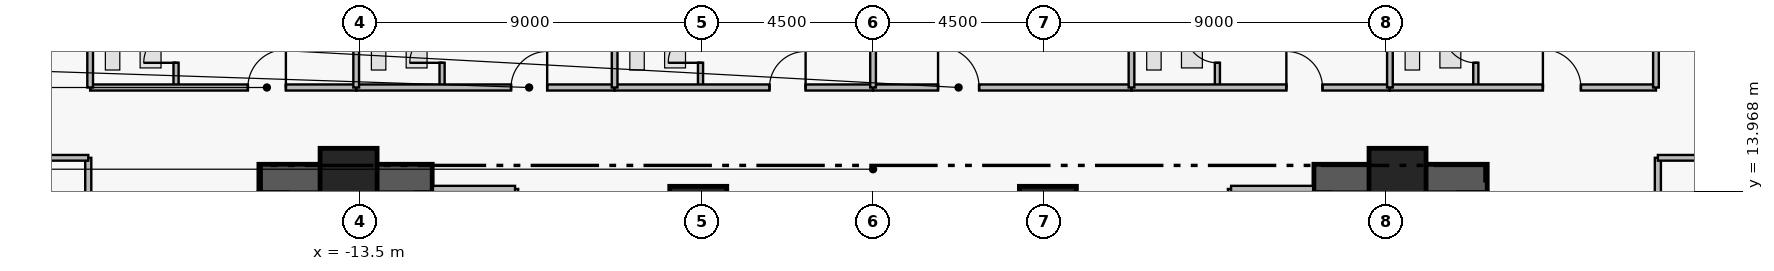
"""IFC4 building model, lengths in metres.
Left out: names, types, materials, properties, quantities, classifications, styles, units other than length and angle.
Written with IfcOpenShell. Run it as: python <this file> out.ifc"""

import sys

from ifc_helpers import new_model, si_unit, direction, frame, frame_2d, origin, origin_2d, place, context, subcontext, project, spatial, rectangle, extrude, element, fill, save


model = new_model("IFC4")
c1 = context("Model", 3, precision=1e-05, world=origin(), true_north=direction((0.0, 1.0)))
c2 = subcontext(c1, "Body", "Model", "MODEL_VIEW")
j1 = project(units=[si_unit("LENGTHUNIT", "METRE"), si_unit("PLANEANGLEUNIT", "RADIAN")], contexts=[c1])
p1 = place(None, origin())
s1 = spatial("IfcSite", under=j1, at=p1, CompositionType="ELEMENT")
p2 = place(p1, origin())
s2 = spatial("IfcBuilding", under=s1, at=p2, CompositionType="ELEMENT")
p3 = place(p2, frame((0.0, 0.0, 132.15)))
s3 = spatial("IfcBuildingStorey", under=s2, at=p3, CompositionType="ELEMENT", Elevation=132.15)
for number, where, z_axis, x_axis in (
    (1, (-16.16, 14.305, 0.0), (0.0, 0.0, 1.0), (1.0, 0.0, 0.0)),
    (2, (11.6, 14.305, 0.0), (0.0, 0.0, 1.0), (1.0, 0.0, 0.0)),
):
    element("IfcWall", number, at=place(p3, frame(where, z_axis=z_axis, x_axis=x_axis)), inside=s3, PredefinedType="SHEAR", context=c2, shape_type="SweptSolid", body=[
        extrude(rectangle(XDim=4.56, YDim=0.75, at=frame_2d((2.28, 0.0))), origin(), (0.0, 0.0, 1.0), 3.46),
    ])
for number, where, z_axis, x_axis in (
    (3, (-13.8, 14.35, 0.0), (0.0, 0.0, 1.0), (1.0, 0.0, 0.0)),
    (4, (-4.6, 13.35, 0.0), (0.0, 0.0, 1.0), (1.0, 0.0, 0.0)),
    (5, (4.6, 13.35, 0.0), (0.0, 0.0, 1.0), (1.0, 0.0, 0.0)),
    (6, (13.8, 14.35, 0.0), (0.0, 0.0, 1.0), (1.0, 0.0, 0.0)),
):
    element("IfcColumn", number, at=place(p3, frame(where, z_axis=z_axis, x_axis=x_axis)), inside=s3, PredefinedType="COLUMN", context=c2, shape_type="SweptSolid", body=[
        extrude(rectangle(XDim=1.5, YDim=1.5, at=origin_2d()), origin(), (0.0, 0.0, 1.0), 3.65),
    ])
p4 = place(p3, frame((-18.34, 16.7, 0.0), z_axis=(0.0, 0.0, 1.0), x_axis=(0.0, 1.0, 0.0)))
e7 = element("IfcWall", 7, at=p4, inside=s3, PredefinedType="PLUMBINGWALL", context=c2, shape_type="SweptSolid", body=[
    extrude(rectangle(XDim=2.36, YDim=0.135, at=frame_2d((1.18, 0.0))), origin(), (0.0, 0.0, 1.0), 3.43),
])
p5 = place(p4, frame((0.65, 0.0, 0.0)))
e8 = element("IfcOpeningElement", 8, at=p5, cuts=e7, PredefinedType="OPENING", context=c2, shape_type="SweptSolid", body=[
    extrude(rectangle(XDim=0.85, YDim=2.1, at=frame_2d((0.425, 1.05))), frame((0.0, 0.077, 0.0), z_axis=(0.0, -1.0, 0.0), x_axis=(1.0, 0.0, 0.0)), (0.0, 0.0, 1.0), 0.155),
])
p6 = place(p3, frame((-20.6, 16.7, 0.0), z_axis=(0.0, 0.0, 1.0), x_axis=(1.0, 0.0, 0.0)))
e9 = element("IfcWall", 9, at=p6, inside=s3, PredefinedType="PARTITIONING", context=c2, shape_type="SweptSolid", body=[
    extrude(rectangle(XDim=7.0, YDim=0.16, at=frame_2d((3.5, 0.0))), origin(), (0.0, 0.0, 1.0), 3.43),
])
p7 = place(p6, frame((4.15, 0.0, 0.0)))
e10 = element("IfcOpeningElement", 10, at=p7, cuts=e9, PredefinedType="OPENING", context=c2, shape_type="SweptSolid", body=[
    extrude(rectangle(XDim=1.0, YDim=2.15, at=frame_2d((0.5, 1.075))), frame((0.0, 0.09, 0.0), z_axis=(0.0, -1.0, 0.0), x_axis=(1.0, 0.0, 0.0)), (0.0, 0.0, 1.0), 0.18),
])
p8 = place(p3, frame((-11.34, 16.7, 0.0), z_axis=(0.0, 0.0, 1.0), x_axis=(0.0, 1.0, 0.0)))
e11 = element("IfcWall", 11, at=p8, inside=s3, PredefinedType="PLUMBINGWALL", context=c2, shape_type="SweptSolid", body=[
    extrude(rectangle(XDim=2.36, YDim=0.135, at=frame_2d((1.18, 0.0))), origin(), (0.0, 0.0, 1.0), 3.43),
])
p9 = place(p8, frame((0.65, 0.0, 0.0)))
e12 = element("IfcOpeningElement", 12, at=p9, cuts=e11, PredefinedType="OPENING", context=c2, shape_type="SweptSolid", body=[
    extrude(rectangle(XDim=0.85, YDim=2.1, at=frame_2d((0.425, 1.05))), frame((0.0, 0.077, 0.0), z_axis=(0.0, -1.0, 0.0), x_axis=(1.0, 0.0, 0.0)), (0.0, 0.0, 1.0), 0.155),
])
p10 = place(p3, frame((-13.6, 16.7, 0.0), z_axis=(0.0, 0.0, 1.0), x_axis=(1.0, 0.0, 0.0)))
e13 = element("IfcWall", 13, at=p10, inside=s3, PredefinedType="PARTITIONING", context=c2, shape_type="SweptSolid", body=[
    extrude(rectangle(XDim=6.8, YDim=0.16, at=frame_2d((3.4, 0.0))), origin(), (0.0, 0.0, 1.0), 2.973),
])
p11 = place(p10, frame((4.075, 0.0, 0.0)))
e14 = element("IfcOpeningElement", 14, at=p11, cuts=e13, PredefinedType="OPENING", context=c2, shape_type="SweptSolid", body=[
    extrude(rectangle(XDim=0.95, YDim=2.15, at=frame_2d((0.475, 1.075))), frame((0.0, 0.09, 0.0), z_axis=(0.0, -1.0, 0.0), x_axis=(1.0, 0.0, 0.0)), (0.0, 0.0, 1.0), 0.18),
])
p12 = place(p3, frame((-4.54, 16.7, 0.0), z_axis=(0.0, 0.0, 1.0), x_axis=(0.0, 1.0, 0.0)))
e15 = element("IfcWall", 15, at=p12, inside=s3, PredefinedType="PLUMBINGWALL", context=c2, shape_type="SweptSolid", body=[
    extrude(rectangle(XDim=2.36, YDim=0.135, at=frame_2d((1.18, 0.0))), origin(), (0.0, 0.0, 1.0), 2.503),
])
p13 = place(p12, frame((0.65, 0.0, 0.0)))
e16 = element("IfcOpeningElement", 16, at=p13, cuts=e15, PredefinedType="OPENING", context=c2, shape_type="SweptSolid", body=[
    extrude(rectangle(XDim=0.85, YDim=2.1, at=frame_2d((0.425, 1.05))), frame((0.0, 0.077, 0.0), z_axis=(0.0, -1.0, 0.0), x_axis=(1.0, 0.0, 0.0)), (0.0, 0.0, 1.0), 0.155),
])
p14 = place(p3, frame((-6.8, 16.7, 0.0), z_axis=(0.0, 0.0, 1.0), x_axis=(1.0, 0.0, 0.0)))
e17 = element("IfcWall", 17, at=p14, inside=s3, PredefinedType="PARTITIONING", context=c2, shape_type="SweptSolid", body=[
    extrude(rectangle(XDim=6.8, YDim=0.16, at=frame_2d((3.4, 0.0))), origin(), (0.0, 0.0, 1.0), 2.973),
])
p15 = place(p14, frame((4.075, 0.0, 0.0)))
e18 = element("IfcOpeningElement", 18, at=p15, cuts=e17, PredefinedType="OPENING", context=c2, shape_type="SweptSolid", body=[
    extrude(rectangle(XDim=0.95, YDim=2.15, at=frame_2d((0.475, 1.075))), frame((0.0, 0.09, 0.0), z_axis=(0.0, -1.0, 0.0), x_axis=(1.0, 0.0, 0.0)), (0.0, 0.0, 1.0), 0.18),
])
p16 = place(p3, frame((0.0, 16.7, 0.0), z_axis=(0.0, 0.0, 1.0), x_axis=(1.0, 0.0, 0.0)))
e19 = element("IfcWall", 19, at=p16, inside=s3, PredefinedType="PARTITIONING", context=c2, shape_type="SweptSolid", body=[
    extrude(rectangle(XDim=6.8, YDim=0.16, at=frame_2d((3.4, 0.0))), origin(), (0.0, 0.0, 1.0), 2.973),
])
p17 = place(p16, frame((1.71, 0.0, 0.0)))
e20 = element("IfcOpeningElement", 20, at=p17, cuts=e19, PredefinedType="OPENING", context=c2, shape_type="SweptSolid", body=[
    extrude(rectangle(XDim=1.08, YDim=2.18, at=frame_2d((0.54, 1.09))), frame((0.0, 0.09, 0.0), z_axis=(0.0, -1.0, 0.0), x_axis=(1.0, 0.0, 0.0)), (0.0, 0.0, 1.0), 0.18),
])
p18 = place(p3, frame((9.06, 16.7, 0.0), z_axis=(0.0, 0.0, 1.0), x_axis=(0.0, 1.0, 0.0)))
e21 = element("IfcWall", 21, at=p18, inside=s3, PredefinedType="PLUMBINGWALL", context=c2, shape_type="SweptSolid", body=[
    extrude(rectangle(XDim=2.36, YDim=0.135, at=frame_2d((1.18, 0.0))), origin(), (0.0, 0.0, 1.0), 3.43),
])
p19 = place(p18, frame((0.65, 0.0, 0.0)))
e22 = element("IfcOpeningElement", 22, at=p19, cuts=e21, PredefinedType="OPENING", context=c2, shape_type="SweptSolid", body=[
    extrude(rectangle(XDim=0.85, YDim=2.1, at=frame_2d((0.425, 1.05))), frame((0.0, 0.077, 0.0), z_axis=(0.0, -1.0, 0.0), x_axis=(1.0, 0.0, 0.0)), (0.0, 0.0, 1.0), 0.155),
])
p20 = place(p3, frame((6.8, 16.7, 0.0), z_axis=(0.0, 0.0, 1.0), x_axis=(1.0, 0.0, 0.0)))
e23 = element("IfcWall", 23, at=p20, inside=s3, PredefinedType="PARTITIONING", context=c2, shape_type="SweptSolid", body=[
    extrude(rectangle(XDim=6.8, YDim=0.16, at=frame_2d((3.4, 0.0))), origin(), (0.0, 0.0, 1.0), 2.973),
])
p21 = place(p20, frame((4.075, 0.0, 0.0)))
e24 = element("IfcOpeningElement", 24, at=p21, cuts=e23, PredefinedType="OPENING", context=c2, shape_type="SweptSolid", body=[
    extrude(rectangle(XDim=0.95, YDim=2.15, at=frame_2d((0.475, 1.075))), frame((0.0, 0.09, 0.0), z_axis=(0.0, -1.0, 0.0), x_axis=(1.0, 0.0, 0.0)), (0.0, 0.0, 1.0), 0.18),
])
p22 = place(p3, frame((15.86, 16.7, 0.0), z_axis=(0.0, 0.0, 1.0), x_axis=(0.0, 1.0, 0.0)))
e25 = element("IfcWall", 25, at=p22, inside=s3, PredefinedType="PLUMBINGWALL", context=c2, shape_type="SweptSolid", body=[
    extrude(rectangle(XDim=2.36, YDim=0.135, at=frame_2d((1.18, 0.0))), origin(), (0.0, 0.0, 1.0), 3.43),
])
p23 = place(p22, frame((0.65, 0.0, 0.0)))
e26 = element("IfcOpeningElement", 26, at=p23, cuts=e25, PredefinedType="OPENING", context=c2, shape_type="SweptSolid", body=[
    extrude(rectangle(XDim=0.85, YDim=2.1, at=frame_2d((0.425, 1.05))), frame((0.0, 0.077, 0.0), z_axis=(0.0, -1.0, 0.0), x_axis=(1.0, 0.0, 0.0)), (0.0, 0.0, 1.0), 0.155),
])
p24 = place(p3, frame((13.6, 16.7, 0.0), z_axis=(0.0, 0.0, 1.0), x_axis=(1.0, 0.0, 0.0)))
e27 = element("IfcWall", 27, at=p24, inside=s3, PredefinedType="PARTITIONING", context=c2, shape_type="SweptSolid", body=[
    extrude(rectangle(XDim=7.0, YDim=0.16, at=frame_2d((3.5, 0.0))), origin(), (0.0, 0.0, 1.0), 3.43),
])
p25 = place(p24, frame((4.025, 0.0, 0.0)))
e28 = element("IfcOpeningElement", 28, at=p25, cuts=e27, PredefinedType="OPENING", context=c2, shape_type="SweptSolid", body=[
    extrude(rectangle(XDim=1.0, YDim=2.15, at=frame_2d((0.5, 1.075))), frame((0.0, 0.09, 0.0), z_axis=(0.0, -1.0, 0.0), x_axis=(1.0, 0.0, 0.0)), (0.0, 0.0, 1.0), 0.18),
])
p26 = place(p3, frame((20.65, 7.96, 0.0), z_axis=(0.0, 0.0, 1.0), x_axis=(0.0, 1.0, 0.0)))
e29 = element("IfcWall", 29, at=p26, inside=s3, PredefinedType="PARTITIONING", context=c2, shape_type="SweptSolid", body=[
    extrude(rectangle(XDim=6.89, YDim=0.16, at=frame_2d((3.445, 0.0))), origin(), (0.0, 0.0, 1.0), 3.43),
])
p27 = place(p26, frame((2.985, 0.0, 0.0)))
e30 = element("IfcOpeningElement", 30, at=p27, cuts=e29, PredefinedType="OPENING", context=c2, shape_type="SweptSolid", body=[
    extrude(rectangle(XDim=0.92, YDim=2.12, at=frame_2d((0.46, 1.06))), frame((0.0, 0.09, 0.0), z_axis=(0.0, -1.0, 0.0), x_axis=(1.0, 0.0, 0.0)), (0.0, 0.0, 1.0), 0.18),
])
p28 = place(p3, frame((-20.65, 1.55, 0.0), z_axis=(0.0, 0.0, 1.0), x_axis=(0.0, 1.0, 0.0)))
e31 = element("IfcWall", 31, at=p28, inside=s3, PredefinedType="PARTITIONING", context=c2, shape_type="SweptSolid", body=[
    extrude(rectangle(XDim=13.3, YDim=0.16, at=frame_2d((6.65, 0.0))), origin(), (0.0, 0.0, 1.0), 3.43),
])
p29 = place(p28, frame((6.175, 0.0, 0.0)))
e32 = element("IfcOpeningElement", 32, at=p29, cuts=e31, PredefinedType="OPENING", context=c2, shape_type="SweptSolid", body=[
    extrude(rectangle(XDim=0.95, YDim=2.15, at=frame_2d((0.475, 1.075))), frame((0.0, 0.09, 0.0), z_axis=(0.0, -1.0, 0.0), x_axis=(1.0, 0.0, 0.0)), (0.0, 0.0, 1.0), 0.18),
])
p30 = place(p3, frame((-9.42, 11.07, 0.0), z_axis=(0.0, 0.0, 1.0), x_axis=(0.0, 1.0, 0.0)))
e33 = element("IfcWall", 33, at=p30, inside=s3, PredefinedType="PARTITIONING", context=c2, shape_type="SweptSolid", body=[
    extrude(rectangle(XDim=2.96, YDim=0.165, at=frame_2d((1.48, 0.0))), origin(), (0.0, 0.0, 1.0), 3.43),
])
p31 = place(p3, frame((-11.58, 14.03, 0.0), z_axis=(0.0, 0.0, 1.0), x_axis=(1.0, 0.0, 0.0)))
e34 = element("IfcWall", 34, at=p31, inside=s3, PredefinedType="PARTITIONING", context=c2, shape_type="SweptSolid", body=[
    extrude(rectangle(XDim=2.16, YDim=0.165, at=frame_2d((1.08, 0.0))), origin(), (0.0, 0.0, 1.0), 3.43),
])
p32 = place(p3, frame((9.42, 11.07, 0.0), z_axis=(0.0, 0.0, 1.0), x_axis=(0.0, 1.0, 0.0)))
e35 = element("IfcWall", 35, at=p32, inside=s3, PredefinedType="PARTITIONING", context=c2, shape_type="SweptSolid", body=[
    extrude(rectangle(XDim=2.96, YDim=0.165, at=frame_2d((1.48, 0.0))), origin(), (0.0, 0.0, 1.0), 3.43),
])
p33 = place(p3, frame((9.42, 14.03, 0.0), z_axis=(0.0, 0.0, 1.0), x_axis=(1.0, 0.0, 0.0)))
e36 = element("IfcWall", 36, at=p33, inside=s3, PredefinedType="PARTITIONING", context=c2, shape_type="SweptSolid", body=[
    extrude(rectangle(XDim=2.16, YDim=0.165, at=frame_2d((1.08, 0.0))), origin(), (0.0, 0.0, 1.0), 3.43),
])
p34 = place(p3, frame((-20.6, 16.7, 0.0), z_axis=(0.0, 0.0, 1.0), x_axis=(0.0, 1.0, 0.0)))
e37 = element("IfcWall", 37, at=p34, inside=s3, PredefinedType="PARTITIONING", context=c2, shape_type="SweptSolid", body=[
    extrude(rectangle(XDim=8.2, YDim=0.15, at=frame_2d((4.1, 0.0))), origin(), (0.0, 0.0, 1.0), 3.43),
])
p35 = place(p3, frame((-13.6, 16.7, 0.0), z_axis=(0.0, 0.0, 1.0), x_axis=(0.0, 1.0, 0.0)))
e38 = element("IfcWall", 38, at=p35, inside=s3, PredefinedType="PARTITIONING", context=c2, shape_type="SweptSolid", body=[
    extrude(rectangle(XDim=11.62, YDim=0.15, at=frame_2d((5.81, 0.0))), origin(), (0.0, 0.0, 1.0), 2.503),
])
for number, where, z_axis, x_axis in (
    (39, (-6.8, 16.7, 0.0), (0.0, 0.0, 1.0), (0.0, 1.0, 0.0)),
    (40, (0.0, 16.7, 0.0), (0.0, 0.0, 1.0), (0.0, 1.0, 0.0)),
):
    element("IfcWall", number, at=place(p3, frame(where, z_axis=z_axis, x_axis=x_axis)), inside=s3, PredefinedType="PARTITIONING", context=c2, shape_type="SweptSolid", body=[
        extrude(rectangle(XDim=11.62, YDim=0.15, at=frame_2d((5.81, 0.0))), origin(), (0.0, 0.0, 1.0), 3.43),
    ])
p36 = place(p3, frame((6.8, 16.7, 0.0), z_axis=(0.0, 0.0, 1.0), x_axis=(0.0, 1.0, 0.0)))
e41 = element("IfcWall", 41, at=p36, inside=s3, PredefinedType="PARTITIONING", context=c2, shape_type="SweptSolid", body=[
    extrude(rectangle(XDim=11.64, YDim=0.15, at=frame_2d((5.82, 0.0))), origin(), (0.0, 0.0, 1.0), 3.43),
])
p37 = place(p3, frame((13.6, 16.7, 0.0), z_axis=(0.0, 0.0, 1.0), x_axis=(0.0, 1.0, 0.0)))
e42 = element("IfcWall", 42, at=p37, inside=s3, PredefinedType="PARTITIONING", context=c2, shape_type="SweptSolid", body=[
    extrude(rectangle(XDim=11.62, YDim=0.15, at=frame_2d((5.81, 0.0))), origin(), (0.0, 0.0, 1.0), 2.503),
])
p38 = place(p3, frame((20.6, 16.7, 0.0), z_axis=(0.0, 0.0, 1.0), x_axis=(0.0, 1.0, 0.0)))
e43 = element("IfcWall", 43, at=p38, inside=s3, PredefinedType="PARTITIONING", context=c2, shape_type="SweptSolid", body=[
    extrude(rectangle(XDim=8.2, YDim=0.15, at=frame_2d((4.1, 0.0))), origin(), (0.0, 0.0, 1.0), 3.43),
])
for number, where, z_axis, x_axis in (
    (44, (20.65, 14.85, 0.0), (0.0, 0.0, 1.0), (1.0, 0.0, 0.0)),
    (45, (-23.84, 14.85, 0.0), (0.0, 0.0, 1.0), (1.0, 0.0, 0.0)),
):
    element("IfcWall", number, at=place(p3, frame(where, z_axis=z_axis, x_axis=x_axis)), inside=s3, PredefinedType="PARTITIONING", context=c2, shape_type="SweptSolid", body=[
        extrude(rectangle(XDim=3.19, YDim=0.15, at=frame_2d((1.595, 0.0))), origin(), (0.0, 0.0, 1.0), 3.43),
    ])
p39 = place(p5, origin())
e46 = element("IfcDoor", 46, at=p39, inside=s3, OperationType="SINGLE_SWING_LEFT", PredefinedType="DOOR", context=c2, shape_type="SweptSolid", body=[
    extrude(rectangle(XDim=0.85, YDim=2.1, at=frame_2d((0.425, 1.05))), frame((0.0, 0.025, 0.0), z_axis=(0.0, -1.0, 0.0), x_axis=(1.0, 0.0, 0.0)), (0.0, 0.0, 1.0), 0.05),
])
fill(e8, e46)
p40 = place(p7, origin())
e47 = element("IfcDoor", 47, at=p40, inside=s3, OperationType="SINGLE_SWING_RIGHT", PredefinedType="DOOR", context=c2, shape_type="SweptSolid", body=[
    extrude(rectangle(XDim=1.0, YDim=2.15, at=frame_2d((0.5, 1.075))), frame((0.0, 0.025, 0.0), z_axis=(0.0, -1.0, 0.0), x_axis=(1.0, 0.0, 0.0)), (0.0, 0.0, 1.0), 0.05),
])
fill(e10, e47)
p41 = place(p9, origin())
e48 = element("IfcDoor", 48, at=p41, inside=s3, OperationType="SINGLE_SWING_LEFT", PredefinedType="DOOR", context=c2, shape_type="SweptSolid", body=[
    extrude(rectangle(XDim=0.85, YDim=2.1, at=frame_2d((0.425, 1.05))), frame((0.0, 0.025, 0.0), z_axis=(0.0, -1.0, 0.0), x_axis=(1.0, 0.0, 0.0)), (0.0, 0.0, 1.0), 0.05),
])
fill(e12, e48)
p42 = place(p11, origin())
e49 = element("IfcDoor", 49, at=p42, inside=s3, OperationType="SINGLE_SWING_RIGHT", PredefinedType="DOOR", context=c2, shape_type="SweptSolid", body=[
    extrude(rectangle(XDim=0.95, YDim=2.15, at=frame_2d((0.475, 1.075))), frame((0.0, 0.025, 0.0), z_axis=(0.0, -1.0, 0.0), x_axis=(1.0, 0.0, 0.0)), (0.0, 0.0, 1.0), 0.05),
])
fill(e14, e49)
p43 = place(p13, origin())
e50 = element("IfcDoor", 50, at=p43, inside=s3, OperationType="SINGLE_SWING_LEFT", PredefinedType="DOOR", context=c2, shape_type="SweptSolid", body=[
    extrude(rectangle(XDim=0.85, YDim=2.1, at=frame_2d((0.425, 1.05))), frame((0.0, 0.025, 0.0), z_axis=(0.0, -1.0, 0.0), x_axis=(1.0, 0.0, 0.0)), (0.0, 0.0, 1.0), 0.05),
])
fill(e16, e50)
p44 = place(p15, origin())
e51 = element("IfcDoor", 51, at=p44, inside=s3, OperationType="SINGLE_SWING_RIGHT", PredefinedType="DOOR", context=c2, shape_type="SweptSolid", body=[
    extrude(rectangle(XDim=0.95, YDim=2.15, at=frame_2d((0.475, 1.075))), frame((0.0, 0.025, 0.0), z_axis=(0.0, -1.0, 0.0), x_axis=(1.0, 0.0, 0.0)), (0.0, 0.0, 1.0), 0.05),
])
fill(e18, e51)
p45 = place(p17, origin())
e52 = element("IfcDoor", 52, at=p45, inside=s3, OperationType="SINGLE_SWING_LEFT", PredefinedType="DOOR", context=c2, shape_type="SweptSolid", body=[
    extrude(rectangle(XDim=1.08, YDim=2.18, at=frame_2d((0.54, 1.09))), frame((0.0, 0.025, 0.0), z_axis=(0.0, -1.0, 0.0), x_axis=(1.0, 0.0, 0.0)), (0.0, 0.0, 1.0), 0.05),
])
fill(e20, e52)
p46 = place(p19, origin())
e53 = element("IfcDoor", 53, at=p46, inside=s3, OperationType="SINGLE_SWING_RIGHT", PredefinedType="DOOR", context=c2, shape_type="SweptSolid", body=[
    extrude(rectangle(XDim=0.85, YDim=2.1, at=frame_2d((0.425, 1.05))), frame((0.0, 0.025, 0.0), z_axis=(0.0, -1.0, 0.0), x_axis=(1.0, 0.0, 0.0)), (0.0, 0.0, 1.0), 0.05),
])
fill(e22, e53)
p47 = place(p21, origin())
e54 = element("IfcDoor", 54, at=p47, inside=s3, OperationType="SINGLE_SWING_LEFT", PredefinedType="DOOR", context=c2, shape_type="SweptSolid", body=[
    extrude(rectangle(XDim=0.95, YDim=2.15, at=frame_2d((0.475, 1.075))), frame((0.0, 0.025, 0.0), z_axis=(0.0, -1.0, 0.0), x_axis=(1.0, 0.0, 0.0)), (0.0, 0.0, 1.0), 0.05),
])
fill(e24, e54)
p48 = place(p23, origin())
e55 = element("IfcDoor", 55, at=p48, inside=s3, OperationType="SINGLE_SWING_RIGHT", PredefinedType="DOOR", context=c2, shape_type="SweptSolid", body=[
    extrude(rectangle(XDim=0.85, YDim=2.1, at=frame_2d((0.425, 1.05))), frame((0.0, 0.025, 0.0), z_axis=(0.0, -1.0, 0.0), x_axis=(1.0, 0.0, 0.0)), (0.0, 0.0, 1.0), 0.05),
])
fill(e26, e55)
p49 = place(p25, origin())
e56 = element("IfcDoor", 56, at=p49, inside=s3, OperationType="SINGLE_SWING_LEFT", PredefinedType="DOOR", context=c2, shape_type="SweptSolid", body=[
    extrude(rectangle(XDim=1.0, YDim=2.15, at=frame_2d((0.5, 1.075))), frame((0.0, 0.025, 0.0), z_axis=(0.0, -1.0, 0.0), x_axis=(1.0, 0.0, 0.0)), (0.0, 0.0, 1.0), 0.05),
])
fill(e28, e56)
save(model, sys.argv[1])
